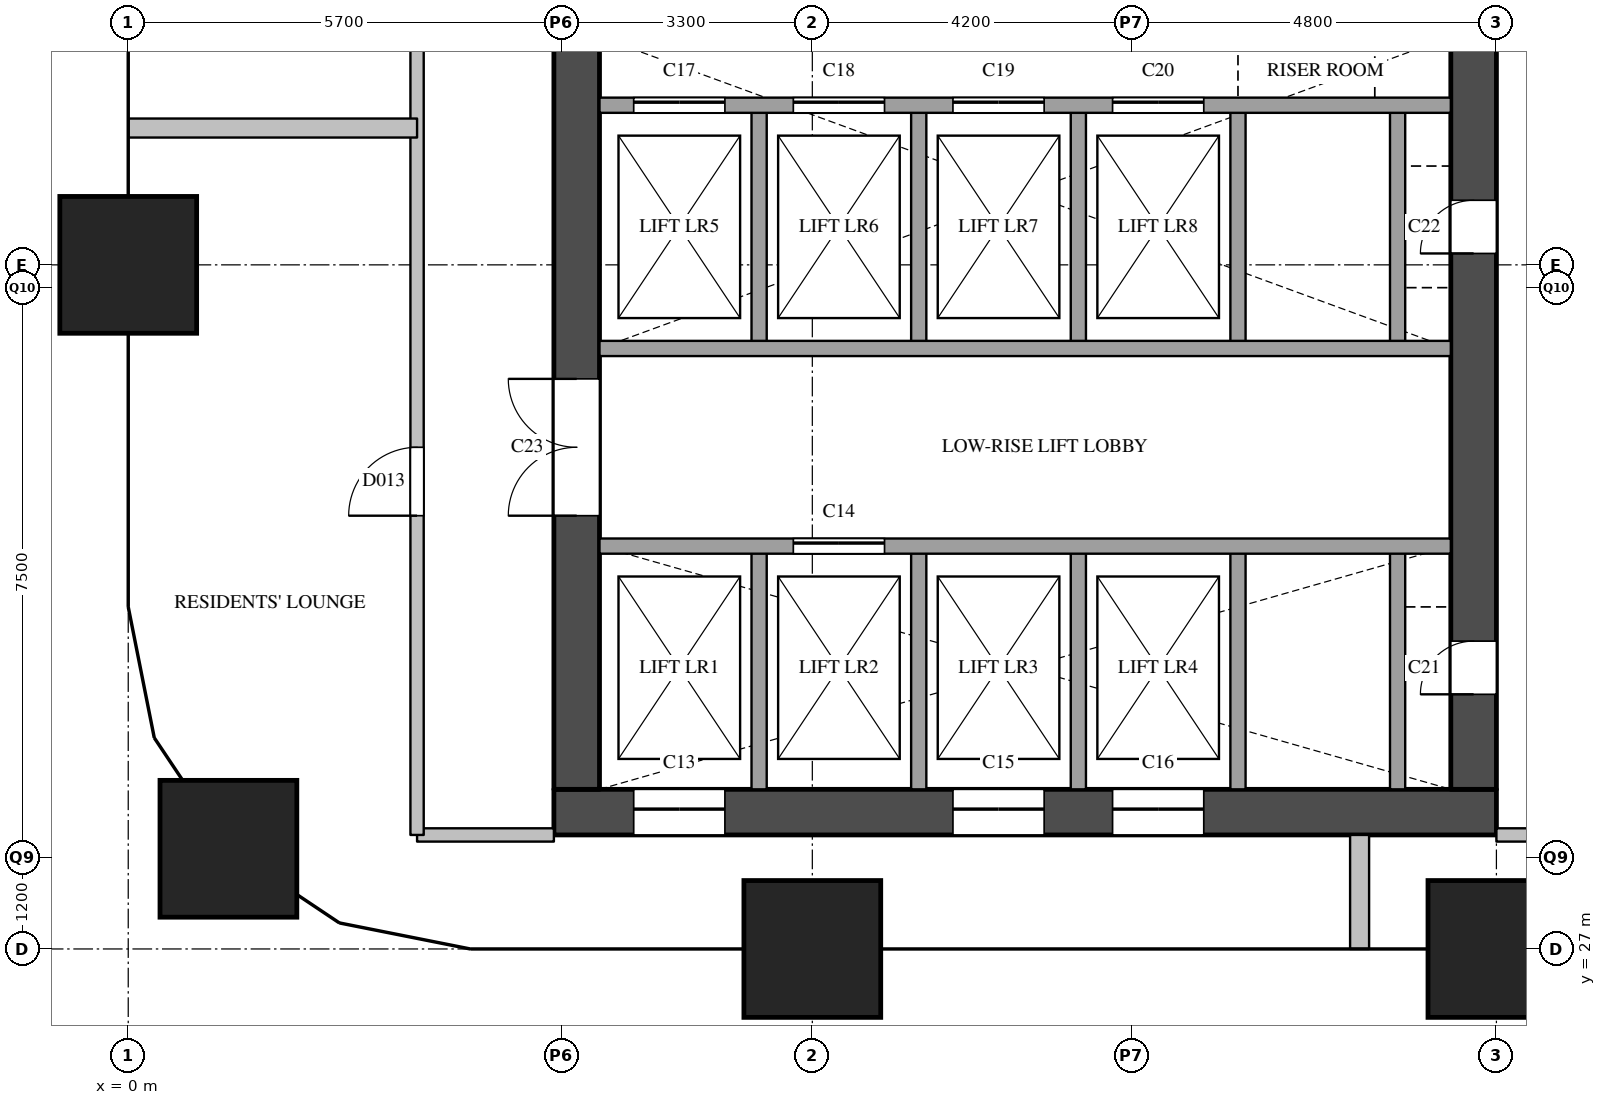
"""IFC4 building model, lengths in metres.
Left out: names, types, materials, properties, quantities, classifications, styles, units other than length and angle.
Written with IfcOpenShell. Run it as: python <this file> out.ifc"""

import sys

from ifc_helpers import new_model, si_unit, direction, frame, frame_2d, origin, origin_2d, place, context, subcontext, project, spatial, rectangle, extrude, element, fill, save


model = new_model("IFC4")
c1 = context("Model", 3, precision=1e-05, world=origin(), true_north=direction((0.0, 1.0)))
c2 = subcontext(c1, "Body", "Model", "MODEL_VIEW")
j1 = project(units=[si_unit("LENGTHUNIT", "METRE"), si_unit("PLANEANGLEUNIT", "RADIAN")], contexts=[c1])
p1 = place(None, origin())
s1 = spatial("IfcSite", under=j1, at=p1, CompositionType="ELEMENT")
p2 = place(p1, origin())
s2 = spatial("IfcBuilding", under=s1, at=p2, CompositionType="ELEMENT")
p3 = place(p2, frame((0.0, 0.0, 89.2)))
s3 = spatial("IfcBuildingStorey", under=s2, at=p3, CompositionType="ELEMENT", Elevation=89.2)
for number, where, z_axis, x_axis in (
    (1, (1.318, 28.318, 0.0), (0.0, 0.0, 1.0), (1.0, 0.0, 0.0)),
    (2, (0.0, 36.0, 0.0), (0.0, 0.0, 1.0), (1.0, 0.0, 0.0)),
    (3, (9.0, 27.0, 0.0), (0.0, 0.0, 1.0), (1.0, 0.0, 0.0)),
    (4, (18.0, 27.0, 0.0), (0.0, 0.0, 1.0), (1.0, 0.0, 0.0)),
):
    element("IfcColumn", number, at=place(p3, frame(where, z_axis=z_axis, x_axis=x_axis)), inside=s3, PredefinedType="COLUMN", context=c2, shape_type="SweptSolid", body=[
        extrude(rectangle(XDim=1.8, YDim=1.8, at=origin_2d()), origin(), (0.0, 0.0, 1.0), 3.8),
    ])
p4 = place(p3, frame((5.6, 28.8, 0.0), z_axis=(0.0, 0.0, 1.0), x_axis=(1.0, 0.0, 0.0)))
e5 = element("IfcWall", 5, at=p4, inside=s3, PredefinedType="SHEAR", context=c2, shape_type="SweptSolid", body=[
    extrude(rectangle(XDim=12.4, YDim=0.6, at=frame_2d((6.2, 0.0))), origin(), (0.0, 0.0, 1.0), 3.5),
])
p5 = place(p4, frame((1.05, 0.0, 0.0)))
e6 = element("IfcOpeningElement", 6, at=p5, cuts=e5, PredefinedType="OPENING", context=c2, shape_type="SweptSolid", body=[
    extrude(rectangle(XDim=1.2, YDim=2.1, at=frame_2d((0.6, 1.05))), frame((0.0, 0.31, 0.0), z_axis=(0.0, -1.0, 0.0), x_axis=(1.0, 0.0, 0.0)), (0.0, 0.0, 1.0), 0.62),
])
p6 = place(p4, frame((5.25, 0.0, 0.0)))
e7 = element("IfcOpeningElement", 7, at=p6, cuts=e5, PredefinedType="OPENING", context=c2, shape_type="SweptSolid", body=[
    extrude(rectangle(XDim=1.2, YDim=2.1, at=frame_2d((0.6, 1.05))), frame((0.0, 0.31, 0.0), z_axis=(0.0, -1.0, 0.0), x_axis=(1.0, 0.0, 0.0)), (0.0, 0.0, 1.0), 0.62),
])
p7 = place(p4, frame((7.35, 0.0, 0.0)))
e8 = element("IfcOpeningElement", 8, at=p7, cuts=e5, PredefinedType="OPENING", context=c2, shape_type="SweptSolid", body=[
    extrude(rectangle(XDim=1.2, YDim=2.1, at=frame_2d((0.6, 1.05))), frame((0.0, 0.31, 0.0), z_axis=(0.0, -1.0, 0.0), x_axis=(1.0, 0.0, 0.0)), (0.0, 0.0, 1.0), 0.62),
])
p8 = place(p3, frame((5.9, 29.1, 0.0), z_axis=(0.0, 0.0, 1.0), x_axis=(0.0, 1.0, 0.0)))
e9 = element("IfcWall", 9, at=p8, inside=s3, PredefinedType="SHEAR", context=c2, shape_type="SweptSolid", body=[
    extrude(rectangle(XDim=20.3, YDim=0.6, at=frame_2d((10.15, 0.0))), origin(), (0.0, 0.0, 1.0), 3.5),
])
p9 = place(p8, frame((3.6, 0.0, 0.0)))
e10 = element("IfcOpeningElement", 10, at=p9, cuts=e9, PredefinedType="OPENING", context=c2, shape_type="SweptSolid", body=[
    extrude(rectangle(XDim=1.8, YDim=2.1, at=frame_2d((0.9, 1.05))), frame((0.0, 0.31, 0.0), z_axis=(0.0, -1.0, 0.0), x_axis=(1.0, 0.0, 0.0)), (0.0, 0.0, 1.0), 0.62),
])
p10 = place(p8, frame((16.4, 0.0, 0.0)))
e11 = element("IfcOpeningElement", 11, at=p10, cuts=e9, PredefinedType="OPENING", context=c2, shape_type="SweptSolid", body=[
    extrude(rectangle(XDim=1.0, YDim=2.1, at=frame_2d((0.5, 1.05))), frame((0.0, 0.31, 0.0), z_axis=(0.0, -1.0, 0.0), x_axis=(1.0, 0.0, 0.0)), (0.0, 0.0, 1.0), 0.62),
])
p11 = place(p3, frame((17.7, 29.1, 0.0), z_axis=(0.0, 0.0, 1.0), x_axis=(0.0, 1.0, 0.0)))
e12 = element("IfcWall", 12, at=p11, inside=s3, PredefinedType="SHEAR", context=c2, shape_type="SweptSolid", body=[
    extrude(rectangle(XDim=20.3, YDim=0.6, at=frame_2d((10.15, 0.0))), origin(), (0.0, 0.0, 1.0), 3.5),
])
p12 = place(p11, frame((1.25, 0.0, 0.0)))
e13 = element("IfcOpeningElement", 13, at=p12, cuts=e12, PredefinedType="OPENING", context=c2, shape_type="SweptSolid", body=[
    extrude(rectangle(XDim=0.7, YDim=2.1, at=frame_2d((0.35, 1.05))), frame((0.0, 0.31, 0.0), z_axis=(0.0, -1.0, 0.0), x_axis=(1.0, 0.0, 0.0)), (0.0, 0.0, 1.0), 0.62),
])
p13 = place(p11, frame((7.05, 0.0, 0.0)))
e14 = element("IfcOpeningElement", 14, at=p13, cuts=e12, PredefinedType="OPENING", context=c2, shape_type="SweptSolid", body=[
    extrude(rectangle(XDim=0.7, YDim=2.1, at=frame_2d((0.35, 1.05))), frame((0.0, 0.31, 0.0), z_axis=(0.0, -1.0, 0.0), x_axis=(1.0, 0.0, 0.0)), (0.0, 0.0, 1.0), 0.62),
])
p14 = place(p3, frame((8.3, 29.1, 0.0), z_axis=(0.0, 0.0, 1.0), x_axis=(0.0, 1.0, 0.0)))
e15 = element("IfcWall", 15, at=p14, inside=s3, PredefinedType="SOLIDWALL", context=c2, shape_type="SweptSolid", body=[
    extrude(rectangle(XDim=3.2, YDim=0.2, at=frame_2d((1.6, 0.0))), origin(), (0.0, 0.0, 1.0), 3.5),
])
p15 = place(p3, frame((8.3, 34.9, 0.0), z_axis=(0.0, 0.0, 1.0), x_axis=(0.0, 1.0, 0.0)))
e16 = element("IfcWall", 16, at=p15, inside=s3, PredefinedType="SOLIDWALL", context=c2, shape_type="SweptSolid", body=[
    extrude(rectangle(XDim=3.2, YDim=0.2, at=frame_2d((1.6, 0.0))), origin(), (0.0, 0.0, 1.0), 3.5),
])
p16 = place(p3, frame((10.4, 29.1, 0.0), z_axis=(0.0, 0.0, 1.0), x_axis=(0.0, 1.0, 0.0)))
e17 = element("IfcWall", 17, at=p16, inside=s3, PredefinedType="SOLIDWALL", context=c2, shape_type="SweptSolid", body=[
    extrude(rectangle(XDim=3.2, YDim=0.2, at=frame_2d((1.6, 0.0))), origin(), (0.0, 0.0, 1.0), 3.5),
])
p17 = place(p3, frame((10.4, 34.9, 0.0), z_axis=(0.0, 0.0, 1.0), x_axis=(0.0, 1.0, 0.0)))
e18 = element("IfcWall", 18, at=p17, inside=s3, PredefinedType="SOLIDWALL", context=c2, shape_type="SweptSolid", body=[
    extrude(rectangle(XDim=3.2, YDim=0.2, at=frame_2d((1.6, 0.0))), origin(), (0.0, 0.0, 1.0), 3.5),
])
p18 = place(p3, frame((12.5, 29.1, 0.0), z_axis=(0.0, 0.0, 1.0), x_axis=(0.0, 1.0, 0.0)))
e19 = element("IfcWall", 19, at=p18, inside=s3, PredefinedType="SOLIDWALL", context=c2, shape_type="SweptSolid", body=[
    extrude(rectangle(XDim=3.2, YDim=0.2, at=frame_2d((1.6, 0.0))), origin(), (0.0, 0.0, 1.0), 3.5),
])
p19 = place(p3, frame((12.5, 34.9, 0.0), z_axis=(0.0, 0.0, 1.0), x_axis=(0.0, 1.0, 0.0)))
e20 = element("IfcWall", 20, at=p19, inside=s3, PredefinedType="SOLIDWALL", context=c2, shape_type="SweptSolid", body=[
    extrude(rectangle(XDim=3.2, YDim=0.2, at=frame_2d((1.6, 0.0))), origin(), (0.0, 0.0, 1.0), 3.5),
])
p20 = place(p3, frame((14.6, 29.1, 0.0), z_axis=(0.0, 0.0, 1.0), x_axis=(0.0, 1.0, 0.0)))
e21 = element("IfcWall", 21, at=p20, inside=s3, PredefinedType="SOLIDWALL", context=c2, shape_type="SweptSolid", body=[
    extrude(rectangle(XDim=3.2, YDim=0.2, at=frame_2d((1.6, 0.0))), origin(), (0.0, 0.0, 1.0), 3.5),
])
p21 = place(p3, frame((14.6, 34.9, 0.0), z_axis=(0.0, 0.0, 1.0), x_axis=(0.0, 1.0, 0.0)))
e22 = element("IfcWall", 22, at=p21, inside=s3, PredefinedType="SOLIDWALL", context=c2, shape_type="SweptSolid", body=[
    extrude(rectangle(XDim=3.2, YDim=0.2, at=frame_2d((1.6, 0.0))), origin(), (0.0, 0.0, 1.0), 3.5),
])
p22 = place(p3, frame((16.7, 29.1, 0.0), z_axis=(0.0, 0.0, 1.0), x_axis=(0.0, 1.0, 0.0)))
e23 = element("IfcWall", 23, at=p22, inside=s3, PredefinedType="SOLIDWALL", context=c2, shape_type="SweptSolid", body=[
    extrude(rectangle(XDim=3.2, YDim=0.2, at=frame_2d((1.6, 0.0))), origin(), (0.0, 0.0, 1.0), 3.5),
])
p23 = place(p3, frame((16.7, 34.9, 0.0), z_axis=(0.0, 0.0, 1.0), x_axis=(0.0, 1.0, 0.0)))
e24 = element("IfcWall", 24, at=p23, inside=s3, PredefinedType="SOLIDWALL", context=c2, shape_type="SweptSolid", body=[
    extrude(rectangle(XDim=3.2, YDim=0.2, at=frame_2d((1.6, 0.0))), origin(), (0.0, 0.0, 1.0), 3.5),
])
p24 = place(p3, frame((6.2, 32.3, 0.0), z_axis=(0.0, 0.0, 1.0), x_axis=(1.0, 0.0, 0.0)))
e25 = element("IfcWall", 25, at=p24, inside=s3, PredefinedType="SOLIDWALL", context=c2, shape_type="SweptSolid", body=[
    extrude(rectangle(XDim=11.2, YDim=0.2, at=frame_2d((5.6, 0.0))), origin(), (0.0, 0.0, 1.0), 3.5),
])
p25 = place(p24, frame((2.55, 0.0, 0.0)))
e26 = element("IfcOpeningElement", 26, at=p25, cuts=e25, PredefinedType="OPENING", context=c2, shape_type="SweptSolid", body=[
    extrude(rectangle(XDim=1.2, YDim=2.1, at=frame_2d((0.6, 1.05))), frame((0.0, 0.11, 0.0), z_axis=(0.0, -1.0, 0.0), x_axis=(1.0, 0.0, 0.0)), (0.0, 0.0, 1.0), 0.22),
])
p26 = place(p3, frame((6.2, 34.9, 0.0), z_axis=(0.0, 0.0, 1.0), x_axis=(1.0, 0.0, 0.0)))
e27 = element("IfcWall", 27, at=p26, inside=s3, PredefinedType="SOLIDWALL", context=c2, shape_type="SweptSolid", body=[
    extrude(rectangle(XDim=11.2, YDim=0.2, at=frame_2d((5.6, 0.0))), origin(), (0.0, 0.0, 1.0), 3.5),
])
p27 = place(p3, frame((6.2, 38.1, 0.0), z_axis=(0.0, 0.0, 1.0), x_axis=(1.0, 0.0, 0.0)))
e28 = element("IfcWall", 28, at=p27, inside=s3, PredefinedType="SOLIDWALL", context=c2, shape_type="SweptSolid", body=[
    extrude(rectangle(XDim=11.2, YDim=0.2, at=frame_2d((5.6, 0.0))), origin(), (0.0, 0.0, 1.0), 3.5),
])
p28 = place(p27, frame((0.45, 0.0, 0.0)))
e29 = element("IfcOpeningElement", 29, at=p28, cuts=e28, PredefinedType="OPENING", context=c2, shape_type="SweptSolid", body=[
    extrude(rectangle(XDim=1.2, YDim=2.1, at=frame_2d((0.6, 1.05))), frame((0.0, 0.11, 0.0), z_axis=(0.0, -1.0, 0.0), x_axis=(1.0, 0.0, 0.0)), (0.0, 0.0, 1.0), 0.22),
])
p29 = place(p27, frame((2.55, 0.0, 0.0)))
e30 = element("IfcOpeningElement", 30, at=p29, cuts=e28, PredefinedType="OPENING", context=c2, shape_type="SweptSolid", body=[
    extrude(rectangle(XDim=1.2, YDim=2.1, at=frame_2d((0.6, 1.05))), frame((0.0, 0.11, 0.0), z_axis=(0.0, -1.0, 0.0), x_axis=(1.0, 0.0, 0.0)), (0.0, 0.0, 1.0), 0.22),
])
p30 = place(p27, frame((4.65, 0.0, 0.0)))
e31 = element("IfcOpeningElement", 31, at=p30, cuts=e28, PredefinedType="OPENING", context=c2, shape_type="SweptSolid", body=[
    extrude(rectangle(XDim=1.2, YDim=2.1, at=frame_2d((0.6, 1.05))), frame((0.0, 0.11, 0.0), z_axis=(0.0, -1.0, 0.0), x_axis=(1.0, 0.0, 0.0)), (0.0, 0.0, 1.0), 0.22),
])
p31 = place(p27, frame((6.75, 0.0, 0.0)))
e32 = element("IfcOpeningElement", 32, at=p31, cuts=e28, PredefinedType="OPENING", context=c2, shape_type="SweptSolid", body=[
    extrude(rectangle(XDim=1.2, YDim=2.1, at=frame_2d((0.6, 1.05))), frame((0.0, 0.11, 0.0), z_axis=(0.0, -1.0, 0.0), x_axis=(1.0, 0.0, 0.0)), (0.0, 0.0, 1.0), 0.22),
])
for number, where, z_axis, x_axis in (
    (33, (3.8, 28.5, 0.0), (0.0, 0.0, 1.0), (1.0, 0.0, 0.0)),
    (34, (18.0, 28.5, 0.0), (0.0, 0.0, 1.0), (1.0, 0.0, 0.0)),
):
    element("IfcWall", number, at=place(p3, frame(where, z_axis=z_axis, x_axis=x_axis)), inside=s3, PredefinedType="PARTITIONING", context=c2, shape_type="SweptSolid", body=[
        extrude(rectangle(XDim=1.8, YDim=0.175, at=frame_2d((0.9, 0.0))), origin(), (0.0, 0.0, 1.0), 3.5),
    ])
p32 = place(p3, frame((3.8, 28.5, 0.0), z_axis=(0.0, 0.0, 1.0), x_axis=(0.0, 1.0, 0.0)))
e35 = element("IfcWall", 35, at=p32, inside=s3, PredefinedType="PARTITIONING", context=c2, shape_type="SweptSolid", body=[
    extrude(rectangle(XDim=23.3, YDim=0.175, at=frame_2d((11.65, 0.0))), origin(), (0.0, 0.0, 1.0), 3.5),
])
p33 = place(p32, frame((4.2, 0.0, 0.0)))
e36 = element("IfcOpeningElement", 36, at=p33, cuts=e35, PredefinedType="OPENING", context=c2, shape_type="SweptSolid", body=[
    extrude(rectangle(XDim=0.9, YDim=2.1, at=frame_2d((0.45, 1.05))), frame((0.0, 0.097, 0.0), z_axis=(0.0, -1.0, 0.0), x_axis=(1.0, 0.0, 0.0)), (0.0, 0.0, 1.0), 0.195),
])
p34 = place(p32, frame((14.25, 0.0, 0.0)))
e37 = element("IfcOpeningElement", 37, at=p34, cuts=e35, PredefinedType="OPENING", context=c2, shape_type="SweptSolid", body=[
    extrude(rectangle(XDim=0.9, YDim=2.1, at=frame_2d((0.45, 1.05))), frame((0.0, 0.097, 0.0), z_axis=(0.0, -1.0, 0.0), x_axis=(1.0, 0.0, 0.0)), (0.0, 0.0, 1.0), 0.195),
])
p35 = place(p32, frame((21.25, 0.0, 0.0)))
e38 = element("IfcOpeningElement", 38, at=p35, cuts=e35, PredefinedType="OPENING", context=c2, shape_type="SweptSolid", body=[
    extrude(rectangle(XDim=0.9, YDim=2.1, at=frame_2d((0.45, 1.05))), frame((0.0, 0.097, 0.0), z_axis=(0.0, -1.0, 0.0), x_axis=(1.0, 0.0, 0.0)), (0.0, 0.0, 1.0), 0.195),
])
p36 = place(p3, frame((0.0, 37.8, 0.0), z_axis=(0.0, 0.0, 1.0), x_axis=(1.0, 0.0, 0.0)))
e39 = element("IfcWall", 39, at=p36, inside=s3, PredefinedType="PARTITIONING", context=c2, shape_type="SweptSolid", body=[
    extrude(rectangle(XDim=3.8, YDim=0.25, at=frame_2d((1.9, 0.0))), origin(), (0.0, 0.0, 1.0), 2.5),
])
p37 = place(p3, frame((16.2, 27.0, 0.0), z_axis=(0.0, 0.0, 1.0), x_axis=(0.0, 1.0, 0.0)))
e40 = element("IfcWall", 40, at=p37, inside=s3, PredefinedType="PARTITIONING", context=c2, shape_type="SweptSolid", body=[
    extrude(rectangle(XDim=1.5, YDim=0.25, at=frame_2d((0.75, 0.0))), origin(), (0.0, 0.0, 1.0), 2.5),
])
p38 = place(p5, origin())
e41 = element("IfcDoor", 41, at=p38, inside=s3, OperationType="SLIDING_TO_LEFT", PredefinedType="DOOR", context=c2, shape_type="SweptSolid", body=[
    extrude(rectangle(XDim=1.2, YDim=2.1, at=frame_2d((0.6, 1.05))), frame((0.0, 0.025, 0.0), z_axis=(0.0, -1.0, 0.0), x_axis=(1.0, 0.0, 0.0)), (0.0, 0.0, 1.0), 0.05),
])
fill(e6, e41)
p39 = place(p25, origin())
e42 = element("IfcDoor", 42, at=p39, inside=s3, OperationType="SLIDING_TO_LEFT", PredefinedType="DOOR", context=c2, shape_type="SweptSolid", body=[
    extrude(rectangle(XDim=1.2, YDim=2.1, at=frame_2d((0.6, 1.05))), frame((0.0, 0.025, 0.0), z_axis=(0.0, -1.0, 0.0), x_axis=(1.0, 0.0, 0.0)), (0.0, 0.0, 1.0), 0.05),
])
fill(e26, e42)
p40 = place(p6, origin())
e43 = element("IfcDoor", 43, at=p40, inside=s3, OperationType="SLIDING_TO_LEFT", PredefinedType="DOOR", context=c2, shape_type="SweptSolid", body=[
    extrude(rectangle(XDim=1.2, YDim=2.1, at=frame_2d((0.6, 1.05))), frame((0.0, 0.025, 0.0), z_axis=(0.0, -1.0, 0.0), x_axis=(1.0, 0.0, 0.0)), (0.0, 0.0, 1.0), 0.05),
])
fill(e7, e43)
p41 = place(p7, origin())
e44 = element("IfcDoor", 44, at=p41, inside=s3, OperationType="SLIDING_TO_LEFT", PredefinedType="DOOR", context=c2, shape_type="SweptSolid", body=[
    extrude(rectangle(XDim=1.2, YDim=2.1, at=frame_2d((0.6, 1.05))), frame((0.0, 0.025, 0.0), z_axis=(0.0, -1.0, 0.0), x_axis=(1.0, 0.0, 0.0)), (0.0, 0.0, 1.0), 0.05),
])
fill(e8, e44)
p42 = place(p28, origin())
e45 = element("IfcDoor", 45, at=p42, inside=s3, OperationType="SLIDING_TO_LEFT", PredefinedType="DOOR", context=c2, shape_type="SweptSolid", body=[
    extrude(rectangle(XDim=1.2, YDim=2.1, at=frame_2d((0.6, 1.05))), frame((0.0, 0.025, 0.0), z_axis=(0.0, -1.0, 0.0), x_axis=(1.0, 0.0, 0.0)), (0.0, 0.0, 1.0), 0.05),
])
fill(e29, e45)
p43 = place(p29, origin())
e46 = element("IfcDoor", 46, at=p43, inside=s3, OperationType="SLIDING_TO_LEFT", PredefinedType="DOOR", context=c2, shape_type="SweptSolid", body=[
    extrude(rectangle(XDim=1.2, YDim=2.1, at=frame_2d((0.6, 1.05))), frame((0.0, 0.025, 0.0), z_axis=(0.0, -1.0, 0.0), x_axis=(1.0, 0.0, 0.0)), (0.0, 0.0, 1.0), 0.05),
])
fill(e30, e46)
p44 = place(p30, origin())
e47 = element("IfcDoor", 47, at=p44, inside=s3, OperationType="SLIDING_TO_LEFT", PredefinedType="DOOR", context=c2, shape_type="SweptSolid", body=[
    extrude(rectangle(XDim=1.2, YDim=2.1, at=frame_2d((0.6, 1.05))), frame((0.0, 0.025, 0.0), z_axis=(0.0, -1.0, 0.0), x_axis=(1.0, 0.0, 0.0)), (0.0, 0.0, 1.0), 0.05),
])
fill(e31, e47)
p45 = place(p31, origin())
e48 = element("IfcDoor", 48, at=p45, inside=s3, OperationType="SLIDING_TO_LEFT", PredefinedType="DOOR", context=c2, shape_type="SweptSolid", body=[
    extrude(rectangle(XDim=1.2, YDim=2.1, at=frame_2d((0.6, 1.05))), frame((0.0, 0.025, 0.0), z_axis=(0.0, -1.0, 0.0), x_axis=(1.0, 0.0, 0.0)), (0.0, 0.0, 1.0), 0.05),
])
fill(e32, e48)
p46 = place(p12, origin())
e49 = element("IfcDoor", 49, at=p46, inside=s3, OperationType="SINGLE_SWING_LEFT", PredefinedType="DOOR", context=c2, shape_type="SweptSolid", body=[
    extrude(rectangle(XDim=0.7, YDim=2.1, at=frame_2d((0.35, 1.05))), frame((0.0, 0.025, 0.0), z_axis=(0.0, -1.0, 0.0), x_axis=(1.0, 0.0, 0.0)), (0.0, 0.0, 1.0), 0.05),
])
fill(e13, e49)
p47 = place(p13, origin())
e50 = element("IfcDoor", 50, at=p47, inside=s3, OperationType="SINGLE_SWING_LEFT", PredefinedType="DOOR", context=c2, shape_type="SweptSolid", body=[
    extrude(rectangle(XDim=0.7, YDim=2.1, at=frame_2d((0.35, 1.05))), frame((0.0, 0.025, 0.0), z_axis=(0.0, -1.0, 0.0), x_axis=(1.0, 0.0, 0.0)), (0.0, 0.0, 1.0), 0.05),
])
fill(e14, e50)
p48 = place(p9, origin())
e51 = element("IfcDoor", 51, at=p48, inside=s3, OperationType="DOUBLE_DOOR_SINGLE_SWING", PredefinedType="DOOR", context=c2, shape_type="SweptSolid", body=[
    extrude(rectangle(XDim=1.8, YDim=2.1, at=frame_2d((0.9, 1.05))), frame((0.0, 0.025, 0.0), z_axis=(0.0, -1.0, 0.0), x_axis=(1.0, 0.0, 0.0)), (0.0, 0.0, 1.0), 0.05),
])
fill(e10, e51)
p49 = place(p33, origin())
e52 = element("IfcDoor", 52, at=p49, inside=s3, OperationType="SINGLE_SWING_LEFT", PredefinedType="DOOR", context=c2, shape_type="SweptSolid", body=[
    extrude(rectangle(XDim=0.9, YDim=2.1, at=frame_2d((0.45, 1.05))), frame((0.0, 0.025, 0.0), z_axis=(0.0, -1.0, 0.0), x_axis=(1.0, 0.0, 0.0)), (0.0, 0.0, 1.0), 0.05),
])
fill(e36, e52)
save(model, sys.argv[1])
